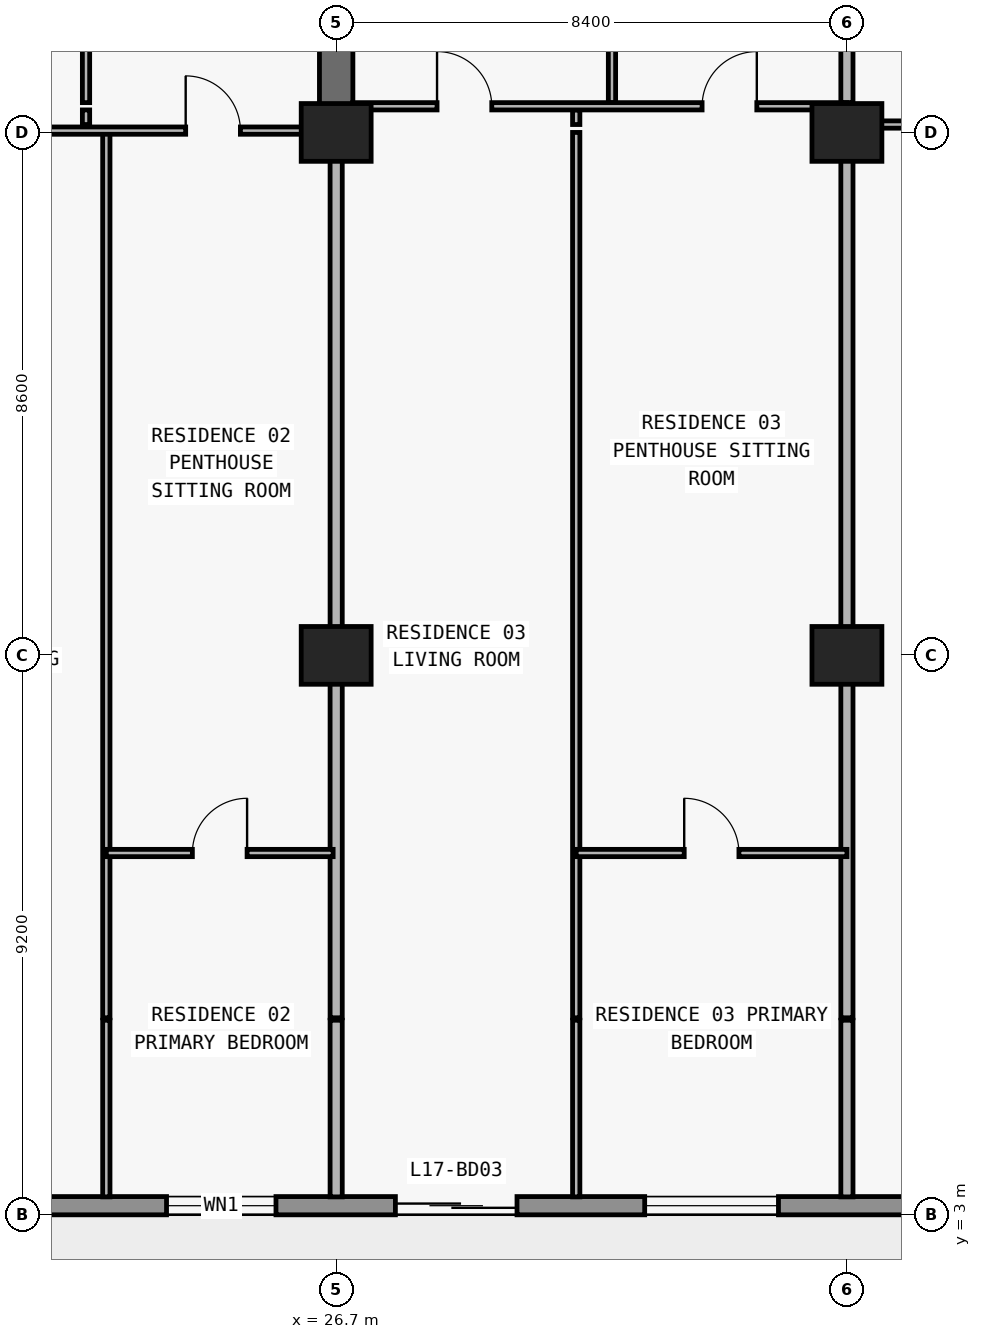
"""IFC4 building model, lengths in metres.
Left out: names, types, materials, properties, quantities, classifications, styles, units other than length and angle.
Written with IfcOpenShell. Run it as: python <this file> out.ifc"""

import sys

from ifc_helpers import new_model, si_unit, direction, frame, frame_2d, origin, origin_2d, place, context, subcontext, project, spatial, rectangle, extrude, element, fill, save


model = new_model("IFC4")
c1 = context("Model", 3, precision=1e-05, world=origin(), true_north=direction((0.0, 1.0)))
c2 = subcontext(c1, "Body", "Model", "MODEL_VIEW")
j1 = project(units=[si_unit("LENGTHUNIT", "METRE"), si_unit("PLANEANGLEUNIT", "RADIAN")], contexts=[c1])
p1 = place(None, origin())
s1 = spatial("IfcSite", under=j1, at=p1, CompositionType="ELEMENT")
p2 = place(p1, origin())
s2 = spatial("IfcBuilding", under=s1, at=p2, CompositionType="ELEMENT")
p3 = place(p2, frame((0.0, 0.0, 66.3)))
s3 = spatial("IfcBuildingStorey", under=s2, at=p3, CompositionType="ELEMENT", Elevation=66.3)
for number, where, z_axis, x_axis in (
    (1, (26.7, 12.2, 0.0), (0.0, 0.0, 1.0), (1.0, 0.0, 0.0)),
    (2, (35.1, 12.2, 0.0), (0.0, 0.0, 1.0), (1.0, 0.0, 0.0)),
    (3, (26.7, 20.8, 0.0), (0.0, 0.0, 1.0), (1.0, 0.0, 0.0)),
    (4, (35.1, 20.8, 0.0), (0.0, 0.0, 1.0), (1.0, 0.0, 0.0)),
):
    element("IfcColumn", number, at=place(p3, frame(where, z_axis=z_axis, x_axis=x_axis)), inside=s3, PredefinedType="COLUMN", context=c2, shape_type="SweptSolid", body=[
        extrude(rectangle(XDim=1.15, YDim=0.95, at=origin_2d()), origin(), (0.0, 0.0, 1.0), 3.05),
    ])
p4 = place(p3, frame((26.7, 20.8, 0.0), z_axis=(0.0, 0.0, 1.0), x_axis=(0.0, 1.0, 0.0)))
e5 = element("IfcWall", 5, at=p4, inside=s3, PredefinedType="SHEAR", context=c2, shape_type="SweptSolid", body=[
    extrude(rectangle(XDim=8.6, YDim=0.55, at=frame_2d((4.3, 0.0))), origin(), (0.0, 0.0, 1.0), 3.05),
])
p5 = place(p3, frame((72.7, 3.15, 0.0), z_axis=(0.0, 0.0, 1.0), x_axis=(-1.0, 0.0, 0.0)))
e6 = element("IfcWall", 6, at=p5, inside=s3, PredefinedType="STANDARD", context=c2, shape_type="SweptSolid", body=[
    extrude(rectangle(XDim=67.6, YDim=0.3, at=frame_2d((33.8, 0.0))), origin(), (0.0, 0.0, 1.0), 3.05),
])
p6 = place(p5, frame((59.826, 0.0, 0.0)))
e7 = element("IfcOpeningElement", 7, at=p6, cuts=e6, PredefinedType="OPENING", context=c2, shape_type="SweptSolid", body=[
    extrude(rectangle(XDim=2.0, YDim=2.3, at=frame_2d((1.0, 1.15))), frame((0.0, 0.16, 0.0), z_axis=(0.0, -1.0, 0.0), x_axis=(1.0, 0.0, 0.0)), (0.0, 0.0, 1.0), 0.32),
])
p7 = place(p5, frame((55.526, 0.0, 0.85)))
e8 = element("IfcOpeningElement", 8, at=p7, cuts=e6, PredefinedType="OPENING", context=c2, shape_type="SweptSolid", body=[
    extrude(rectangle(XDim=2.2, YDim=1.55, at=frame_2d((1.1, 0.775))), frame((0.0, 0.16, 0.0), z_axis=(0.0, -1.0, 0.0), x_axis=(1.0, 0.0, 0.0)), (0.0, 0.0, 1.0), 0.32),
])
p8 = place(p5, frame((51.09, 0.0, 0.0)))
e9 = element("IfcOpeningElement", 9, at=p8, cuts=e6, PredefinedType="OPENING", context=c2, shape_type="SweptSolid", body=[
    extrude(rectangle(XDim=2.0, YDim=2.3, at=frame_2d((1.0, 1.15))), frame((0.0, 0.16, 0.0), z_axis=(0.0, -1.0, 0.0), x_axis=(1.0, 0.0, 0.0)), (0.0, 0.0, 1.0), 0.32),
])
p9 = place(p5, frame((46.99, 0.0, 0.85)))
e10 = element("IfcOpeningElement", 10, at=p9, cuts=e6, PredefinedType="OPENING", context=c2, shape_type="SweptSolid", body=[
    extrude(rectangle(XDim=1.8, YDim=1.55, at=frame_2d((0.9, 0.775))), frame((0.0, 0.16, 0.0), z_axis=(0.0, -1.0, 0.0), x_axis=(1.0, 0.0, 0.0)), (0.0, 0.0, 1.0), 0.32),
])
p10 = place(p5, frame((43.026, 0.0, 0.0)))
e11 = element("IfcOpeningElement", 11, at=p10, cuts=e6, PredefinedType="OPENING", context=c2, shape_type="SweptSolid", body=[
    extrude(rectangle(XDim=2.0, YDim=2.3, at=frame_2d((1.0, 1.15))), frame((0.0, 0.16, 0.0), z_axis=(0.0, -1.0, 0.0), x_axis=(1.0, 0.0, 0.0)), (0.0, 0.0, 1.0), 0.32),
])
p11 = place(p5, frame((38.726, 0.0, 0.85)))
e12 = element("IfcOpeningElement", 12, at=p11, cuts=e6, PredefinedType="OPENING", context=c2, shape_type="SweptSolid", body=[
    extrude(rectangle(XDim=2.2, YDim=1.55, at=frame_2d((1.1, 0.775))), frame((0.0, 0.16, 0.0), z_axis=(0.0, -1.0, 0.0), x_axis=(1.0, 0.0, 0.0)), (0.0, 0.0, 1.0), 0.32),
])
p12 = place(p5, frame((34.51, 0.0, 0.0)))
e13 = element("IfcOpeningElement", 13, at=p12, cuts=e6, PredefinedType="OPENING", context=c2, shape_type="SweptSolid", body=[
    extrude(rectangle(XDim=2.0, YDim=2.3, at=frame_2d((1.0, 1.15))), frame((0.0, 0.16, 0.0), z_axis=(0.0, -1.0, 0.0), x_axis=(1.0, 0.0, 0.0)), (0.0, 0.0, 1.0), 0.32),
])
p13 = place(p5, frame((30.81, 0.0, 0.85)))
e14 = element("IfcOpeningElement", 14, at=p13, cuts=e6, PredefinedType="OPENING", context=c2, shape_type="SweptSolid", body=[
    extrude(rectangle(XDim=1.8, YDim=1.55, at=frame_2d((0.9, 0.775))), frame((0.0, 0.16, 0.0), z_axis=(0.0, -1.0, 0.0), x_axis=(1.0, 0.0, 0.0)), (0.0, 0.0, 1.0), 0.32),
])
p14 = place(p5, frame((27.026, 0.0, 0.0)))
e15 = element("IfcOpeningElement", 15, at=p14, cuts=e6, PredefinedType="OPENING", context=c2, shape_type="SweptSolid", body=[
    extrude(rectangle(XDim=2.0, YDim=2.3, at=frame_2d((1.0, 1.15))), frame((0.0, 0.16, 0.0), z_axis=(0.0, -1.0, 0.0), x_axis=(1.0, 0.0, 0.0)), (0.0, 0.0, 1.0), 0.32),
])
p15 = place(p5, frame((22.726, 0.0, 0.85)))
e16 = element("IfcOpeningElement", 16, at=p15, cuts=e6, PredefinedType="OPENING", context=c2, shape_type="SweptSolid", body=[
    extrude(rectangle(XDim=2.2, YDim=1.55, at=frame_2d((1.1, 0.775))), frame((0.0, 0.16, 0.0), z_axis=(0.0, -1.0, 0.0), x_axis=(1.0, 0.0, 0.0)), (0.0, 0.0, 1.0), 0.32),
])
p16 = place(p5, frame((18.29, 0.0, 0.0)))
e17 = element("IfcOpeningElement", 17, at=p16, cuts=e6, PredefinedType="OPENING", context=c2, shape_type="SweptSolid", body=[
    extrude(rectangle(XDim=2.0, YDim=2.3, at=frame_2d((1.0, 1.15))), frame((0.0, 0.16, 0.0), z_axis=(0.0, -1.0, 0.0), x_axis=(1.0, 0.0, 0.0)), (0.0, 0.0, 1.0), 0.32),
])
p17 = place(p5, frame((14.19, 0.0, 0.85)))
e18 = element("IfcOpeningElement", 18, at=p17, cuts=e6, PredefinedType="OPENING", context=c2, shape_type="SweptSolid", body=[
    extrude(rectangle(XDim=1.8, YDim=1.55, at=frame_2d((0.9, 0.775))), frame((0.0, 0.16, 0.0), z_axis=(0.0, -1.0, 0.0), x_axis=(1.0, 0.0, 0.0)), (0.0, 0.0, 1.0), 0.32),
])
p18 = place(p5, frame((10.226, 0.0, 0.0)))
e19 = element("IfcOpeningElement", 19, at=p18, cuts=e6, PredefinedType="OPENING", context=c2, shape_type="SweptSolid", body=[
    extrude(rectangle(XDim=2.0, YDim=2.3, at=frame_2d((1.0, 1.15))), frame((0.0, 0.16, 0.0), z_axis=(0.0, -1.0, 0.0), x_axis=(1.0, 0.0, 0.0)), (0.0, 0.0, 1.0), 0.32),
])
p19 = place(p5, frame((5.926, 0.0, 0.85)))
e20 = element("IfcOpeningElement", 20, at=p19, cuts=e6, PredefinedType="OPENING", context=c2, shape_type="SweptSolid", body=[
    extrude(rectangle(XDim=2.2, YDim=1.55, at=frame_2d((1.1, 0.775))), frame((0.0, 0.16, 0.0), z_axis=(0.0, -1.0, 0.0), x_axis=(1.0, 0.0, 0.0)), (0.0, 0.0, 1.0), 0.32),
])
p20 = place(p3, frame((22.586, 20.93, 0.0), z_axis=(0.0, 0.0, 1.0), x_axis=(0.0, 1.0, 0.0)))
e21 = element("IfcWall", 21, at=p20, inside=s3, PredefinedType="PARTITIONING", context=c2, shape_type="SweptSolid", body=[
    extrude(rectangle(XDim=0.24, YDim=0.12, at=frame_2d((0.12, 0.0))), origin(), (0.0, 0.0, 1.0), 2.423),
])
p21 = place(p3, frame((22.586, 21.29, 0.0), z_axis=(0.0, 0.0, 1.0), x_axis=(0.0, 1.0, 0.0)))
e22 = element("IfcWall", 22, at=p21, inside=s3, PredefinedType="PARTITIONING", context=c2, shape_type="SweptSolid", body=[
    extrude(rectangle(XDim=4.69, YDim=0.12, at=frame_2d((2.345, 0.0))), origin(), (0.0, 0.0, 1.0), 2.423),
])
p22 = place(p21, frame((1.895, 0.0, 0.0)))
e23 = element("IfcOpeningElement", 23, at=p22, cuts=e22, PredefinedType="OPENING", context=c2, shape_type="SweptSolid", body=[
    extrude(rectangle(XDim=0.9, YDim=2.15, at=frame_2d((0.45, 1.075))), frame((0.0, 0.07, 0.0), z_axis=(0.0, -1.0, 0.0), x_axis=(1.0, 0.0, 0.0)), (0.0, 0.0, 1.0), 0.14),
])
p23 = place(p3, frame((22.92, 3.295, 0.0), z_axis=(0.0, 0.0, 1.0), x_axis=(0.0, 1.0, 0.0)))
e24 = element("IfcWall", 24, at=p23, inside=s3, PredefinedType="PARTITIONING", context=c2, shape_type="SweptSolid", body=[
    extrude(rectangle(XDim=2.905, YDim=0.12, at=frame_2d((1.453, 0.0))), origin(), (0.0, 0.0, 1.0), 3.05),
])
p24 = place(p3, frame((22.92, 6.24, 0.0), z_axis=(0.0, 0.0, 1.0), x_axis=(0.0, 1.0, 0.0)))
e25 = element("IfcWall", 25, at=p24, inside=s3, PredefinedType="PARTITIONING", context=c2, shape_type="SweptSolid", body=[
    extrude(rectangle(XDim=14.56, YDim=0.12, at=frame_2d((7.28, 0.0))), origin(), (0.0, 0.0, 1.0), 3.05),
])
p25 = place(p3, frame((26.7, 3.295, 0.0), z_axis=(0.0, 0.0, 1.0), x_axis=(0.0, 1.0, 0.0)))
e26 = element("IfcWall", 26, at=p25, inside=s3, PredefinedType="PARTITIONING", context=c2, shape_type="SweptSolid", body=[
    extrude(rectangle(XDim=2.905, YDim=0.2, at=frame_2d((1.453, 0.0))), origin(), (0.0, 0.0, 1.0), 3.05),
])
p26 = place(p3, frame((26.7, 6.24, 0.0), z_axis=(0.0, 0.0, 1.0), x_axis=(0.0, 1.0, 0.0)))
e27 = element("IfcWall", 27, at=p26, inside=s3, PredefinedType="PARTITIONING", context=c2, shape_type="SweptSolid", body=[
    extrude(rectangle(XDim=14.555, YDim=0.2, at=frame_2d((7.277, 0.0))), origin(), (0.0, 0.0, 1.0), 2.11),
])
p27 = place(p3, frame((30.648, 3.295, 0.0), z_axis=(0.0, 0.0, 1.0), x_axis=(0.0, 1.0, 0.0)))
e28 = element("IfcWall", 28, at=p27, inside=s3, PredefinedType="PARTITIONING", context=c2, shape_type="SweptSolid", body=[
    extrude(rectangle(XDim=2.905, YDim=0.12, at=frame_2d((1.453, 0.0))), origin(), (0.0, 0.0, 1.0), 3.05),
])
p28 = place(p3, frame((30.648, 6.24, 0.0), z_axis=(0.0, 0.0, 1.0), x_axis=(0.0, 1.0, 0.0)))
e29 = element("IfcWall", 29, at=p28, inside=s3, PredefinedType="PARTITIONING", context=c2, shape_type="SweptSolid", body=[
    extrude(rectangle(XDim=14.56, YDim=0.12, at=frame_2d((7.28, 0.0))), origin(), (0.0, 0.0, 1.0), 2.423),
])
p29 = place(p3, frame((30.648, 20.93, 0.0), z_axis=(0.0, 0.0, 1.0), x_axis=(0.0, 1.0, 0.0)))
e30 = element("IfcWall", 30, at=p29, inside=s3, PredefinedType="PARTITIONING", context=c2, shape_type="SweptSolid", body=[
    extrude(rectangle(XDim=0.24, YDim=0.12, at=frame_2d((0.12, 0.0))), origin(), (0.0, 0.0, 1.0), 2.423),
])
p30 = place(p3, frame((31.236, 21.29, 0.0), z_axis=(0.0, 0.0, 1.0), x_axis=(0.0, 1.0, 0.0)))
e31 = element("IfcWall", 31, at=p30, inside=s3, PredefinedType="PARTITIONING", context=c2, shape_type="SweptSolid", body=[
    extrude(rectangle(XDim=4.69, YDim=0.12, at=frame_2d((2.345, 0.0))), origin(), (0.0, 0.0, 1.0), 3.05),
])
p31 = place(p30, frame((1.895, 0.0, 0.0)))
e32 = element("IfcOpeningElement", 32, at=p31, cuts=e31, PredefinedType="OPENING", context=c2, shape_type="SweptSolid", body=[
    extrude(rectangle(XDim=0.9, YDim=2.15, at=frame_2d((0.45, 1.075))), frame((0.0, 0.07, 0.0), z_axis=(0.0, -1.0, 0.0), x_axis=(1.0, 0.0, 0.0)), (0.0, 0.0, 1.0), 0.14),
])
p32 = place(p3, frame((35.1, 3.295, 0.0), z_axis=(0.0, 0.0, 1.0), x_axis=(0.0, 1.0, 0.0)))
e33 = element("IfcWall", 33, at=p32, inside=s3, PredefinedType="PARTITIONING", context=c2, shape_type="SweptSolid", body=[
    extrude(rectangle(XDim=2.905, YDim=0.2, at=frame_2d((1.453, 0.0))), origin(), (0.0, 0.0, 1.0), 3.05),
])
p33 = place(p3, frame((35.1, 6.24, 0.0), z_axis=(0.0, 0.0, 1.0), x_axis=(0.0, 1.0, 0.0)))
e34 = element("IfcWall", 34, at=p33, inside=s3, PredefinedType="PARTITIONING", context=c2, shape_type="SweptSolid", body=[
    extrude(rectangle(XDim=14.56, YDim=0.2, at=frame_2d((7.28, 0.0))), origin(), (0.0, 0.0, 1.0), 2.11),
])
p34 = place(p3, frame((35.1, 20.93, 0.0), z_axis=(0.0, 0.0, 1.0), x_axis=(0.0, 1.0, 0.0)))
e35 = element("IfcWall", 35, at=p34, inside=s3, PredefinedType="PARTITIONING", context=c2, shape_type="SweptSolid", body=[
    extrude(rectangle(XDim=0.24, YDim=0.2, at=frame_2d((0.12, 0.0))), origin(), (0.0, 0.0, 1.0), 3.05),
])
p35 = place(p3, frame((35.1, 21.29, 0.0), z_axis=(0.0, 0.0, 1.0), x_axis=(0.0, 1.0, 0.0)))
e36 = element("IfcWall", 36, at=p35, inside=s3, PredefinedType="PARTITIONING", context=c2, shape_type="SweptSolid", body=[
    extrude(rectangle(XDim=4.69, YDim=0.2, at=frame_2d((2.345, 0.0))), origin(), (0.0, 0.0, 1.0), 2.11),
])
p36 = place(p3, frame((22.92, 8.95, 0.0), z_axis=(0.0, 0.0, 1.0), x_axis=(1.0, 0.0, 0.0)))
e37 = element("IfcWall", 37, at=p36, inside=s3, PredefinedType="PARTITIONING", context=c2, shape_type="SweptSolid", body=[
    extrude(rectangle(XDim=3.73, YDim=0.12, at=frame_2d((1.865, 0.0))), origin(), (0.0, 0.0, 1.0), 3.05),
])
p37 = place(p36, frame((1.415, 0.0, 0.0)))
e38 = element("IfcOpeningElement", 38, at=p37, cuts=e37, PredefinedType="OPENING", context=c2, shape_type="SweptSolid", body=[
    extrude(rectangle(XDim=0.9, YDim=2.15, at=frame_2d((0.45, 1.075))), frame((0.0, 0.07, 0.0), z_axis=(0.0, -1.0, 0.0), x_axis=(1.0, 0.0, 0.0)), (0.0, 0.0, 1.0), 0.14),
])
p38 = place(p3, frame((30.648, 8.95, 0.0), z_axis=(0.0, 0.0, 1.0), x_axis=(1.0, 0.0, 0.0)))
e39 = element("IfcWall", 39, at=p38, inside=s3, PredefinedType="PARTITIONING", context=c2, shape_type="SweptSolid", body=[
    extrude(rectangle(XDim=4.452, YDim=0.12, at=frame_2d((2.226, 0.0))), origin(), (0.0, 0.0, 1.0), 3.05),
])
p39 = place(p38, frame((1.776, 0.0, 0.0)))
e40 = element("IfcOpeningElement", 40, at=p39, cuts=e39, PredefinedType="OPENING", context=c2, shape_type="SweptSolid", body=[
    extrude(rectangle(XDim=0.9, YDim=2.15, at=frame_2d((0.45, 1.075))), frame((0.0, 0.07, 0.0), z_axis=(0.0, -1.0, 0.0), x_axis=(1.0, 0.0, 0.0)), (0.0, 0.0, 1.0), 0.14),
])
p40 = place(p3, frame((18.3, 20.83, 0.0), z_axis=(0.0, 0.0, 1.0), x_axis=(1.0, 0.0, 0.0)))
e41 = element("IfcWall", 41, at=p40, inside=s3, PredefinedType="PARTITIONING", context=c2, shape_type="SweptSolid", body=[
    extrude(rectangle(XDim=8.13, YDim=0.12, at=frame_2d((4.065, 0.0))), origin(), (0.0, 0.0, 1.0), 2.11),
])
p41 = place(p40, frame((1.693, 0.0, 0.0)))
e42 = element("IfcOpeningElement", 42, at=p41, cuts=e41, PredefinedType="OPENING", context=c2, shape_type="SweptSolid", body=[
    extrude(rectangle(XDim=0.9, YDim=2.06, at=frame_2d((0.45, 1.03))), frame((0.0, 0.07, 0.0), z_axis=(0.0, -1.0, 0.0), x_axis=(1.0, 0.0, 0.0)), (0.0, 0.0, 1.0), 0.14),
])
p42 = place(p40, frame((5.925, 0.0, 0.0)))
e43 = element("IfcOpeningElement", 43, at=p42, cuts=e41, PredefinedType="OPENING", context=c2, shape_type="SweptSolid", body=[
    extrude(rectangle(XDim=0.9, YDim=2.06, at=frame_2d((0.45, 1.03))), frame((0.0, 0.07, 0.0), z_axis=(0.0, -1.0, 0.0), x_axis=(1.0, 0.0, 0.0)), (0.0, 0.0, 1.0), 0.14),
])
p43 = place(p3, frame((35.1, 20.93, 0.0), z_axis=(0.0, 0.0, 1.0), x_axis=(1.0, 0.0, 0.0)))
e44 = element("IfcWall", 44, at=p43, inside=s3, PredefinedType="PARTITIONING", context=c2, shape_type="SweptSolid", body=[
    extrude(rectangle(XDim=7.6, YDim=0.12, at=frame_2d((3.8, 0.0))), origin(), (0.0, 0.0, 1.0), 2.11),
])
p44 = place(p43, frame((1.64, 0.0, 0.0)))
e45 = element("IfcOpeningElement", 45, at=p44, cuts=e44, PredefinedType="OPENING", context=c2, shape_type="SweptSolid", body=[
    extrude(rectangle(XDim=0.9, YDim=2.06, at=frame_2d((0.45, 1.03))), frame((0.0, 0.07, 0.0), z_axis=(0.0, -1.0, 0.0), x_axis=(1.0, 0.0, 0.0)), (0.0, 0.0, 1.0), 0.14),
])
p45 = place(p43, frame((5.527, 0.0, 0.0)))
e46 = element("IfcOpeningElement", 46, at=p45, cuts=e44, PredefinedType="OPENING", context=c2, shape_type="SweptSolid", body=[
    extrude(rectangle(XDim=0.9, YDim=2.06, at=frame_2d((0.45, 1.03))), frame((0.0, 0.07, 0.0), z_axis=(0.0, -1.0, 0.0), x_axis=(1.0, 0.0, 0.0)), (0.0, 0.0, 1.0), 0.14),
])
p46 = place(p3, frame((26.97, 21.23, 0.0), z_axis=(0.0, 0.0, 1.0), x_axis=(1.0, 0.0, 0.0)))
e47 = element("IfcWall", 47, at=p46, inside=s3, PredefinedType="PARTITIONING", context=c2, shape_type="SweptSolid", body=[
    extrude(rectangle(XDim=8.13, YDim=0.12, at=frame_2d((4.065, 0.0))), origin(), (0.0, 0.0, 1.0), 3.05),
])
p47 = place(p46, frame((1.389, 0.0, 0.0)))
e48 = element("IfcOpeningElement", 48, at=p47, cuts=e47, PredefinedType="OPENING", context=c2, shape_type="SweptSolid", body=[
    extrude(rectangle(XDim=0.9, YDim=2.15, at=frame_2d((0.45, 1.075))), frame((0.0, 0.07, 0.0), z_axis=(0.0, -1.0, 0.0), x_axis=(1.0, 0.0, 0.0)), (0.0, 0.0, 1.0), 0.14),
])
p48 = place(p46, frame((5.748, 0.0, 0.0)))
e49 = element("IfcOpeningElement", 49, at=p48, cuts=e47, PredefinedType="OPENING", context=c2, shape_type="SweptSolid", body=[
    extrude(rectangle(XDim=0.9, YDim=2.15, at=frame_2d((0.45, 1.075))), frame((0.0, 0.07, 0.0), z_axis=(0.0, -1.0, 0.0), x_axis=(1.0, 0.0, 0.0)), (0.0, 0.0, 1.0), 0.14),
])
p49 = place(p9, origin())
e50 = element("IfcWindow", 50, at=p49, inside=s3, PartitioningType="SINGLE_PANEL", PredefinedType="WINDOW", context=c2, shape_type="SweptSolid", body=[
    extrude(rectangle(XDim=1.8, YDim=1.55, at=frame_2d((0.9, 0.775))), frame((0.0, 0.03, 0.0), z_axis=(0.0, -1.0, 0.0), x_axis=(1.0, 0.0, 0.0)), (0.0, 0.0, 1.0), 0.06),
])
fill(e10, e50)
p50 = place(p10, origin())
e51 = element("IfcDoor", 51, at=p50, inside=s3, OperationType="DOUBLE_DOOR_SLIDING", PredefinedType="DOOR", context=c2, shape_type="SweptSolid", body=[
    extrude(rectangle(XDim=2.0, YDim=2.3, at=frame_2d((1.0, 1.15))), frame((0.0, 0.025, 0.0), z_axis=(0.0, -1.0, 0.0), x_axis=(1.0, 0.0, 0.0)), (0.0, 0.0, 1.0), 0.05),
])
fill(e11, e51)
p51 = place(p11, origin())
e52 = element("IfcWindow", 52, at=p51, inside=s3, PartitioningType="SINGLE_PANEL", PredefinedType="WINDOW", context=c2, shape_type="SweptSolid", body=[
    extrude(rectangle(XDim=2.2, YDim=1.55, at=frame_2d((1.1, 0.775))), frame((0.0, 0.03, 0.0), z_axis=(0.0, -1.0, 0.0), x_axis=(1.0, 0.0, 0.0)), (0.0, 0.0, 1.0), 0.06),
])
fill(e12, e52)
p52 = place(p42, origin())
e53 = element("IfcDoor", 53, at=p52, inside=s3, OperationType="SINGLE_SWING_LEFT", PredefinedType="DOOR", context=c2, shape_type="SweptSolid", body=[
    extrude(rectangle(XDim=0.9, YDim=2.06, at=frame_2d((0.45, 1.03))), frame((0.0, 0.025, 0.0), z_axis=(0.0, -1.0, 0.0), x_axis=(1.0, 0.0, 0.0)), (0.0, 0.0, 1.0), 0.05),
])
fill(e43, e53)
p53 = place(p37, origin())
e54 = element("IfcDoor", 54, at=p53, inside=s3, OperationType="SINGLE_SWING_RIGHT", PredefinedType="DOOR", context=c2, shape_type="SweptSolid", body=[
    extrude(rectangle(XDim=0.9, YDim=2.15, at=frame_2d((0.45, 1.075))), frame((0.0, 0.025, 0.0), z_axis=(0.0, -1.0, 0.0), x_axis=(1.0, 0.0, 0.0)), (0.0, 0.0, 1.0), 0.05),
])
fill(e38, e54)
p54 = place(p47, origin())
e55 = element("IfcDoor", 55, at=p54, inside=s3, OperationType="SINGLE_SWING_LEFT", PredefinedType="DOOR", context=c2, shape_type="SweptSolid", body=[
    extrude(rectangle(XDim=0.9, YDim=2.15, at=frame_2d((0.45, 1.075))), frame((0.0, 0.025, 0.0), z_axis=(0.0, -1.0, 0.0), x_axis=(1.0, 0.0, 0.0)), (0.0, 0.0, 1.0), 0.05),
])
fill(e48, e55)
p55 = place(p48, origin())
e56 = element("IfcDoor", 56, at=p55, inside=s3, OperationType="SINGLE_SWING_RIGHT", PredefinedType="DOOR", context=c2, shape_type="SweptSolid", body=[
    extrude(rectangle(XDim=0.9, YDim=2.15, at=frame_2d((0.45, 1.075))), frame((0.0, 0.025, 0.0), z_axis=(0.0, -1.0, 0.0), x_axis=(1.0, 0.0, 0.0)), (0.0, 0.0, 1.0), 0.05),
])
fill(e49, e56)
p56 = place(p39, origin())
e57 = element("IfcDoor", 57, at=p56, inside=s3, OperationType="SINGLE_SWING_LEFT", PredefinedType="DOOR", context=c2, shape_type="SweptSolid", body=[
    extrude(rectangle(XDim=0.9, YDim=2.15, at=frame_2d((0.45, 1.075))), frame((0.0, 0.025, 0.0), z_axis=(0.0, -1.0, 0.0), x_axis=(1.0, 0.0, 0.0)), (0.0, 0.0, 1.0), 0.05),
])
fill(e40, e57)
save(model, sys.argv[1])
